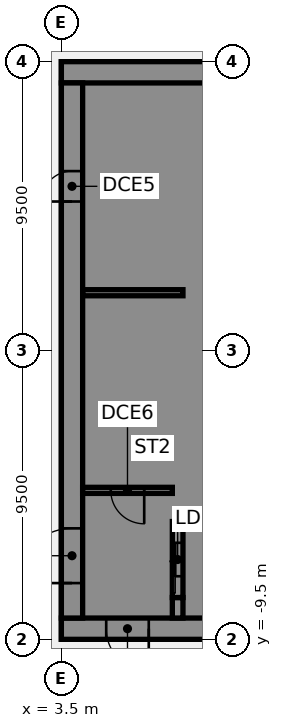
"""IFC4 building model, lengths in metres.
Left out: names, types, materials, properties, quantities, classifications, styles, units other than length and angle.
Written with IfcOpenShell. Run it as: python <this file> out.ifc"""

import sys

from ifc_helpers import new_model, si_unit, direction, frame, frame_2d, origin, place, context, subcontext, project, spatial, polyline, rectangle, outline, extrude, element, fill, save


model = new_model("IFC4")
c1 = context("Model", 3, precision=1e-05, world=origin(), true_north=direction((0.0, 1.0)))
c2 = subcontext(c1, "Body", "Model", "MODEL_VIEW")
j1 = project(units=[si_unit("LENGTHUNIT", "METRE"), si_unit("PLANEANGLEUNIT", "RADIAN")], contexts=[c1])
p1 = place(None, origin())
s1 = spatial("IfcSite", under=j1, at=p1, CompositionType="ELEMENT")
p2 = place(p1, origin())
s2 = spatial("IfcBuilding", under=s1, at=p2, CompositionType="ELEMENT")
p3 = place(p2, frame((0.0, 0.0, 64.0)))
s3 = spatial("IfcBuildingStorey", under=s2, at=p3, CompositionType="ELEMENT", Elevation=64.0)
p4 = place(p3, frame((16.5, -9.15, 0.0), z_axis=(0.0, 0.0, 1.0), x_axis=(-1.0, 0.0, 0.0)))
e1 = element("IfcWall", 1, at=p4, inside=s3, PredefinedType="SHEAR", context=c2, shape_type="SweptSolid", body=[
    extrude(rectangle(XDim=13.0, YDim=0.7, at=frame_2d((6.5, 0.0))), origin(), (0.0, 0.0, 1.0), 3.61),
])
p5 = place(p4, frame((4.15, 0.0, 0.0)))
e2 = element("IfcOpeningElement", 2, at=p5, cuts=e1, PredefinedType="OPENING", context=c2, shape_type="SweptSolid", body=[
    extrude(rectangle(XDim=1.4, YDim=2.1, at=frame_2d((0.7, 1.05))), frame((0.0, 0.36, 0.0), z_axis=(0.0, -1.0, 0.0), x_axis=(1.0, 0.0, 0.0)), (0.0, 0.0, 1.0), 0.72),
])
p6 = place(p4, frame((10.125, 0.0, 0.0)))
e3 = element("IfcOpeningElement", 3, at=p6, cuts=e1, PredefinedType="OPENING", context=c2, shape_type="SweptSolid", body=[
    extrude(rectangle(XDim=1.4, YDim=2.1, at=frame_2d((0.7, 1.05))), frame((0.0, 0.36, 0.0), z_axis=(0.0, -1.0, 0.0), x_axis=(1.0, 0.0, 0.0)), (0.0, 0.0, 1.0), 0.72),
])
p7 = place(p3, frame((16.5, 9.15, 0.0), z_axis=(0.0, 0.0, 1.0), x_axis=(-1.0, 0.0, 0.0)))
e4 = element("IfcWall", 4, at=p7, inside=s3, PredefinedType="SHEAR", context=c2, shape_type="SweptSolid", body=[
    extrude(rectangle(XDim=13.0, YDim=0.7, at=frame_2d((6.5, 0.0))), origin(), (0.0, 0.0, 1.0), 3.61),
])
p8 = place(p3, origin())
e5 = element("IfcWall", 5, at=p8, inside=s3, PredefinedType="SHEAR", context=c2, shape_type="SweptSolid", body=[
    extrude(outline(polyline([(9.8, -5.375), (7.5, -5.375), (7.5, -2.875), (9.8, -2.875), (9.8, -2.625), (7.5, -2.625), (7.5, -0.125), (9.8, -0.125), (9.8, 0.125), (7.5, 0.125), (7.5, 2.625), (9.8, 2.625), (9.8, 2.875), (7.5, 2.875), (7.5, 5.375), (9.8, 5.375), (9.8, 5.625), (7.5, 5.625), (7.5, 8.125), (9.8, 8.125), (9.8, 8.8), (7.5, 8.8), (7.15, 8.8), (7.15, -5.625), (7.5, -5.625), (9.8, -5.625), (9.8, -5.375)])), origin(), (0.0, 0.0, 1.0), 3.61),
])
p9 = place(p3, origin())
e6 = element("IfcWall", 6, at=p9, inside=s3, PredefinedType="SHEAR", context=c2, shape_type="SweptSolid", body=[
    extrude(outline(polyline([(7.5, -8.125), (7.5, -8.8), (9.8, -8.8), (9.8, -8.125), (9.8, -5.625), (9.55, -5.625), (9.55, -8.125), (7.5, -8.125)])), origin(), (0.0, 0.0, 1.0), 3.61),
])
p10 = place(p3, frame((7.325, -8.8, 0.0), z_axis=(0.0, 0.0, 1.0), x_axis=(0.0, 1.0, 0.0)))
e7 = element("IfcWall", 7, at=p10, inside=s3, PredefinedType="SHEAR", context=c2, shape_type="SweptSolid", body=[
    extrude(rectangle(XDim=0.675, YDim=0.35, at=frame_2d((0.337, 0.0))), origin(), (0.0, 0.0, 1.0), 3.61),
])
p11 = place(p3, frame((7.5, 1.9, 0.0), z_axis=(0.0, 0.0, 1.0), x_axis=(-1.0, 0.0, 0.0)))
e8 = element("IfcWall", 8, at=p11, inside=s3, PredefinedType="SHEAR", context=c2, shape_type="SweptSolid", body=[
    extrude(rectangle(XDim=3.3, YDim=0.2, at=frame_2d((1.65, 0.0))), origin(), (0.0, 0.0, 1.0), 3.61),
])
p12 = place(p3, frame((7.325, -8.125, 0.0), z_axis=(0.0, 0.0, 1.0), x_axis=(0.0, 1.0, 0.0)))
e9 = element("IfcWall", 9, at=p12, inside=s3, PredefinedType="SHEAR", context=c2, shape_type="SweptSolid", body=[
    extrude(rectangle(XDim=2.5, YDim=0.35, at=frame_2d((1.25, 0.0))), origin(), (0.0, 0.0, 1.0), 3.61),
])
p13 = place(p12, frame((0.7, 0.0, 0.0)))
e10 = element("IfcOpeningElement", 10, at=p13, cuts=e9, PredefinedType="OPENING", context=c2, shape_type="SweptSolid", body=[
    extrude(rectangle(XDim=1.1, YDim=2.1, at=frame_2d((0.55, 1.05))), frame((0.0, 0.185, 0.0), z_axis=(0.0, -1.0, 0.0), x_axis=(1.0, 0.0, 0.0)), (0.0, 0.0, 1.0), 0.37),
])
p14 = place(p3, frame((3.85, -8.8, 0.0), z_axis=(0.0, 0.0, 1.0), x_axis=(0.0, 1.0, 0.0)))
e11 = element("IfcWall", 11, at=p14, inside=s3, PredefinedType="SHEAR", context=c2, shape_type="SweptSolid", body=[
    extrude(rectangle(XDim=17.6, YDim=0.7, at=frame_2d((8.8, 0.0))), origin(), (0.0, 0.0, 1.0), 3.61),
])
p15 = place(p14, frame((1.15, 0.0, 0.0)))
e12 = element("IfcOpeningElement", 12, at=p15, cuts=e11, PredefinedType="OPENING", context=c2, shape_type="SweptSolid", body=[
    extrude(rectangle(XDim=1.8, YDim=2.1, at=frame_2d((0.9, 1.05))), frame((0.0, 0.36, 0.0), z_axis=(0.0, -1.0, 0.0), x_axis=(1.0, 0.0, 0.0)), (0.0, 0.0, 1.0), 0.72),
])
p16 = place(p14, frame((13.7, 0.0, 0.0)))
e13 = element("IfcOpeningElement", 13, at=p16, cuts=e11, PredefinedType="OPENING", context=c2, shape_type="SweptSolid", body=[
    extrude(rectangle(XDim=1.0, YDim=2.1, at=frame_2d((0.5, 1.05))), frame((0.0, 0.36, 0.0), z_axis=(0.0, -1.0, 0.0), x_axis=(1.0, 0.0, 0.0)), (0.0, 0.0, 1.0), 0.72),
])
p17 = place(p3, frame((7.15, -4.6, 0.0), z_axis=(0.0, 0.0, 1.0), x_axis=(-1.0, 0.0, 0.0)))
e14 = element("IfcWall", 14, at=p17, inside=s3, PredefinedType="SHEAR", context=c2, shape_type="SweptSolid", body=[
    extrude(rectangle(XDim=2.95, YDim=0.2, at=frame_2d((1.475, 0.0))), origin(), (0.0, 0.0, 1.0), 3.61),
])
p18 = place(p17, frame((0.925, 0.0, 0.0)))
e15 = element("IfcOpeningElement", 15, at=p18, cuts=e14, PredefinedType="OPENING", context=c2, shape_type="SweptSolid", body=[
    extrude(rectangle(XDim=1.1, YDim=2.1, at=frame_2d((0.55, 1.05))), frame((0.0, 0.11, 0.0), z_axis=(0.0, -1.0, 0.0), x_axis=(1.0, 0.0, 0.0)), (0.0, 0.0, 1.0), 0.22),
])
p19 = place(p6, origin())
e16 = element("IfcDoor", 16, at=p19, inside=s3, OperationType="SINGLE_SWING_LEFT", PredefinedType="DOOR", context=c2, shape_type="SweptSolid", body=[
    extrude(rectangle(XDim=1.4, YDim=2.1, at=frame_2d((0.7, 1.05))), frame((0.0, 0.025, 0.0), z_axis=(0.0, -1.0, 0.0), x_axis=(1.0, 0.0, 0.0)), (0.0, 0.0, 1.0), 0.05),
])
fill(e3, e16)
p20 = place(p15, origin())
e17 = element("IfcDoor", 17, at=p20, inside=s3, OperationType="SINGLE_SWING_LEFT", PredefinedType="DOOR", context=c2, shape_type="SweptSolid", body=[
    extrude(rectangle(XDim=1.8, YDim=2.1, at=frame_2d((0.9, 1.05))), frame((0.0, 0.025, 0.0), z_axis=(0.0, -1.0, 0.0), x_axis=(1.0, 0.0, 0.0)), (0.0, 0.0, 1.0), 0.05),
])
fill(e12, e17)
p21 = place(p16, origin())
e18 = element("IfcDoor", 18, at=p21, inside=s3, OperationType="SINGLE_SWING_LEFT", PredefinedType="DOOR", context=c2, shape_type="SweptSolid", body=[
    extrude(rectangle(XDim=1.0, YDim=2.1, at=frame_2d((0.5, 1.05))), frame((0.0, 0.025, 0.0), z_axis=(0.0, -1.0, 0.0), x_axis=(1.0, 0.0, 0.0)), (0.0, 0.0, 1.0), 0.05),
])
fill(e13, e18)
p22 = place(p18, origin())
e19 = element("IfcDoor", 19, at=p22, inside=s3, OperationType="SINGLE_SWING_LEFT", PredefinedType="DOOR", context=c2, shape_type="SweptSolid", body=[
    extrude(rectangle(XDim=1.1, YDim=2.1, at=frame_2d((0.55, 1.05))), frame((0.0, 0.025, 0.0), z_axis=(0.0, -1.0, 0.0), x_axis=(1.0, 0.0, 0.0)), (0.0, 0.0, 1.0), 0.05),
])
fill(e15, e19)
p23 = place(p13, origin())
e20 = element("IfcDoor", 20, at=p23, inside=s3, OperationType="SLIDING_TO_LEFT", PredefinedType="DOOR", context=c2, shape_type="SweptSolid", body=[
    extrude(rectangle(XDim=1.1, YDim=2.1, at=frame_2d((0.55, 1.05))), frame((0.0, 0.025, 0.0), z_axis=(0.0, -1.0, 0.0), x_axis=(1.0, 0.0, 0.0)), (0.0, 0.0, 1.0), 0.05),
])
fill(e10, e20)
save(model, sys.argv[1])
